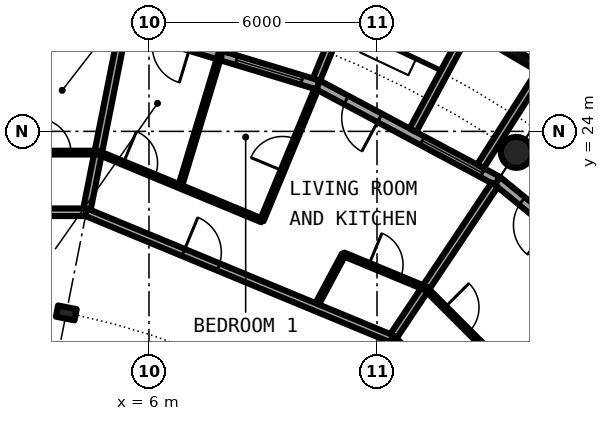
"""IFC4 building model, lengths in metres.
Left out: names, types, materials, properties, quantities, classifications, styles, units other than length and angle.
Written with IfcOpenShell. Run it as: python <this file> out.ifc"""

import sys

from ifc_helpers import new_model, si_unit, direction, frame, frame_2d, origin, origin_2d, place, context, subcontext, project, spatial, rectangle, circle, hollow_circle, i_section, extrude, element, fill, save


model = new_model("IFC4")
c1 = context("Model", 3, precision=1e-05, world=origin(), true_north=direction((0.0, 1.0)))
c2 = subcontext(c1, "Body", "Model", "MODEL_VIEW")
j1 = project(units=[si_unit("LENGTHUNIT", "METRE"), si_unit("PLANEANGLEUNIT", "RADIAN")], contexts=[c1])
p1 = place(None, origin())
s1 = spatial("IfcSite", under=j1, at=p1, CompositionType="ELEMENT")
p2 = place(p1, origin())
s2 = spatial("IfcBuilding", under=s1, at=p2, CompositionType="ELEMENT")
p3 = place(p2, frame((0.0, 0.0, 167.7)))
s3 = spatial("IfcBuildingStorey", under=s2, at=p3, CompositionType="ELEMENT", Elevation=167.7)
p4 = place(p3, frame((15.667, 23.448, 0.0), z_axis=(0.0, 0.0, 1.0), x_axis=(1.0, 0.0, 0.0)))
e1 = element("IfcColumn", 1, at=p4, inside=s3, PredefinedType="COLUMN", context=c2, shape_type="SweptSolid", body=[
    extrude(hollow_circle(Radius=0.406, WallThickness=0.04, at=origin_2d()), origin(), (0.0, 0.0, 1.0), 3.05),
])
p5 = place(p3, frame((3.824, 19.223, 0.0), z_axis=(0.0, 0.0, 1.0), x_axis=(0.195090322016, 0.980785280403, 0.0)))
e2 = element("IfcColumn", 2, at=p5, inside=s3, PredefinedType="COLUMN", context=c2, shape_type="SweptSolid", body=[
    extrude(i_section(OverallWidth=0.3, OverallDepth=0.5, WebThickness=0.014, FlangeThickness=0.028, FilletRadius=0.027, at=origin_2d()), origin(), (0.0, 0.0, 1.0), 3.05),
])
p6 = place(p3, frame((19.304, 19.304, 0.0), z_axis=(0.0, 0.0, 1.0), x_axis=(-0.773019449054, 0.634382322723, 0.0)))
e3 = element("IfcWall", 3, at=p6, inside=s3, PredefinedType="SOLIDWALL", context=c2, shape_type="SweptSolid", body=[
    extrude(rectangle(XDim=5.352, YDim=0.25, at=frame_2d((2.676, 0.0))), origin(), (0.0, 0.0, 1.0), 2.7),
])
p7 = place(p6, frame((0.441, 0.0, 0.3)))
e4 = element("IfcOpeningElement", 4, at=p7, cuts=e3, PredefinedType="OPENING", context=c2, shape_type="SweptSolid", body=[
    extrude(rectangle(XDim=1.8, YDim=2.1, at=frame_2d((0.9, 1.05))), frame((0.0, 0.135, 0.0), z_axis=(0.0, -1.0, 0.0), x_axis=(1.0, 0.0, 0.0)), (0.0, 0.0, 1.0), 0.27),
])
p8 = place(p6, frame((3.51, 0.0, 0.0)))
e5 = element("IfcOpeningElement", 5, at=p8, cuts=e3, PredefinedType="OPENING", context=c2, shape_type="SweptSolid", body=[
    extrude(rectangle(XDim=1.0, YDim=2.2, at=frame_2d((0.5, 1.1))), frame((0.0, 0.135, 0.0), z_axis=(0.0, -1.0, 0.0), x_axis=(1.0, 0.0, 0.0)), (0.0, 0.0, 1.0), 0.27),
])
p9 = place(p3, frame((15.167, 22.699, 0.0), z_axis=(0.0, 0.0, 1.0), x_axis=(-0.881915646801, 0.471407246368, 0.0)))
e6 = element("IfcWall", 6, at=p9, inside=s3, PredefinedType="SOLIDWALL", context=c2, shape_type="SweptSolid", body=[
    extrude(rectangle(XDim=5.352, YDim=0.25, at=frame_2d((2.676, 0.0))), origin(), (0.0, 0.0, 1.0), 2.7),
])
p10 = place(p9, frame((0.441, 0.0, 0.3)))
e7 = element("IfcOpeningElement", 7, at=p10, cuts=e6, PredefinedType="OPENING", context=c2, shape_type="SweptSolid", body=[
    extrude(rectangle(XDim=1.8, YDim=2.1, at=frame_2d((0.9, 1.05))), frame((0.0, 0.135, 0.0), z_axis=(0.0, -1.0, 0.0), x_axis=(1.0, 0.0, 0.0)), (0.0, 0.0, 1.0), 0.27),
])
p11 = place(p9, frame((3.51, 0.0, 0.0)))
e8 = element("IfcOpeningElement", 8, at=p11, cuts=e6, PredefinedType="OPENING", context=c2, shape_type="SweptSolid", body=[
    extrude(rectangle(XDim=1.0, YDim=2.2, at=frame_2d((0.5, 1.1))), frame((0.0, 0.135, 0.0), z_axis=(0.0, -1.0, 0.0), x_axis=(1.0, 0.0, 0.0)), (0.0, 0.0, 1.0), 0.27),
])
p12 = place(p3, frame((16.436, 25.574, -0.03), z_axis=(0.0, 0.0, 1.0), x_axis=(-0.862403467503, 0.506221551535, 0.0)))
e9 = element("IfcWall", 9, at=p12, inside=s3, PredefinedType="SOLIDWALL", context=c2, shape_type="SweptSolid", body=[
    extrude(rectangle(XDim=2.446, YDim=0.2, at=frame_2d((1.223, 0.0))), origin(), (0.0, 0.0, 1.0), 2.73),
])
p13 = place(p12, frame((0.183, 0.0, 0.33)))
e10 = element("IfcOpeningElement", 10, at=p13, cuts=e9, PredefinedType="OPENING", context=c2, shape_type="SweptSolid", body=[
    extrude(circle(Radius=1.04, at=frame_2d((1.04, 1.04))), frame((0.0, 0.11, 0.0), z_axis=(0.0, -1.0, 0.0), x_axis=(1.0, 0.0, 0.0)), (0.0, 0.0, 1.0), 0.22),
])
p14 = place(p3, frame((14.722, 23.079, -0.03), z_axis=(0.0, 0.0, 1.0), x_axis=(0.537572179146, 0.843217737129, 0.0)))
e11 = element("IfcWall", 11, at=p14, inside=s3, PredefinedType="SOLIDWALL", context=c2, shape_type="SweptSolid", body=[
    extrude(rectangle(XDim=2.924, YDim=0.2, at=frame_2d((1.462, 0.0))), origin(), (0.0, 0.0, 1.0), 2.73),
])
p15 = place(p3, frame((12.945, 24.029, -0.03), z_axis=(0.0, 0.0, 1.0), x_axis=(0.474424310775, 0.88029629861, 0.0)))
e12 = element("IfcWall", 12, at=p15, inside=s3, PredefinedType="SOLIDWALL", context=c2, shape_type="SweptSolid", body=[
    extrude(rectangle(XDim=3.006, YDim=0.2, at=frame_2d((1.503, 0.0))), origin(), (0.0, 0.0, 1.0), 2.73),
])
p16 = place(p3, frame((10.447, 25.222, 0.0), z_axis=(0.0, 0.0, 1.0), x_axis=(-0.956965678721, 0.290201119486, 0.0)))
e13 = element("IfcWall", 13, at=p16, inside=s3, PredefinedType="SOLIDWALL", context=c2, shape_type="SweptSolid", body=[
    extrude(rectangle(XDim=5.351, YDim=0.25, at=frame_2d((2.676, 0.0))), origin(), (0.0, 0.0, 1.0), 2.7),
])
p17 = place(p16, frame((0.441, 0.0, 0.3)))
e14 = element("IfcOpeningElement", 14, at=p17, cuts=e13, PredefinedType="OPENING", context=c2, shape_type="SweptSolid", body=[
    extrude(rectangle(XDim=1.8, YDim=2.1, at=frame_2d((0.9, 1.05))), frame((0.0, 0.135, 0.0), z_axis=(0.0, -1.0, 0.0), x_axis=(1.0, 0.0, 0.0)), (0.0, 0.0, 1.0), 0.27),
])
p18 = place(p16, frame((3.51, 0.0, 0.0)))
e15 = element("IfcOpeningElement", 15, at=p18, cuts=e13, PredefinedType="OPENING", context=c2, shape_type="SweptSolid", body=[
    extrude(rectangle(XDim=1.0, YDim=2.2, at=frame_2d((0.5, 1.1))), frame((0.0, 0.135, 0.0), z_axis=(0.0, -1.0, 0.0), x_axis=(1.0, 0.0, 0.0)), (0.0, 0.0, 1.0), 0.27),
])
p19 = place(p3, frame((10.409, 25.364, -0.03), z_axis=(0.0, 0.0, 1.0), x_axis=(0.379509886562, 0.925187681501, 0.0)))
e16 = element("IfcWall", 16, at=p19, inside=s3, PredefinedType="SOLIDWALL", context=c2, shape_type="SweptSolid", body=[
    extrude(rectangle(XDim=2.883, YDim=0.2, at=frame_2d((1.441, 0.0))), origin(), (0.0, 0.0, 1.0), 2.73),
])
p20 = place(p3, frame((8.009, 26.092, -0.03), z_axis=(0.0, 0.0, 1.0), x_axis=(0.293406695073, 0.955987715029, 0.0)))
e17 = element("IfcWall", 17, at=p20, inside=s3, PredefinedType="SOLIDWALL", context=c2, shape_type="SweptSolid", body=[
    extrude(rectangle(XDim=3.006, YDim=0.2, at=frame_2d((1.503, 0.0))), origin(), (0.0, 0.0, 1.0), 2.73),
])
p21 = place(p3, frame((10.38, 19.374, 0.0), z_axis=(0.0, 0.0, 1.0), x_axis=(0.472002235476, 0.881597351236, 0.0)))
e18 = element("IfcWall", 18, at=p21, inside=s3, PredefinedType="PARTITIONING", context=c2, shape_type="SweptSolid", body=[
    extrude(rectangle(XDim=1.577, YDim=0.1, at=frame_2d((0.788, 0.0))), origin(), (0.0, 0.0, 1.0), 2.7),
])
p22 = place(p3, frame((4.351, 21.872, 0.0), z_axis=(0.0, 0.0, 1.0), x_axis=(0.195075825861, 0.980788163756, 0.0)))
e19 = element("IfcWall", 19, at=p22, inside=s3, PredefinedType="PARTITIONING", context=c2, shape_type="SweptSolid", body=[
    extrude(rectangle(XDim=4.875, YDim=0.2, at=frame_2d((2.438, 0.0))), origin(), (0.0, 0.0, 1.0), 2.7),
])
p23 = place(p3, frame((6.817, 22.549, 0.0), z_axis=(0.0, 0.0, 1.0), x_axis=(0.289439829793, 0.957196210256, 0.0)))
e20 = element("IfcWall", 20, at=p23, inside=s3, PredefinedType="PARTITIONING", context=c2, shape_type="SweptSolid", body=[
    extrude(rectangle(XDim=3.618, YDim=0.1, at=frame_2d((1.809, 0.0))), origin(), (0.0, 0.0, 1.0), 2.7),
])
p24 = place(p3, frame((8.97, 21.657, 0.0), z_axis=(0.0, 0.0, 1.0), x_axis=(0.382761856702, 0.923847044188, 0.0)))
e21 = element("IfcWall", 21, at=p24, inside=s3, PredefinedType="PARTITIONING", context=c2, shape_type="SweptSolid", body=[
    extrude(rectangle(XDim=3.733, YDim=0.1, at=frame_2d((1.867, 0.0))), origin(), (0.0, 0.0, 1.0), 2.7),
])
p25 = place(p24, frame((1.417, 0.0, 0.0)))
e22 = element("IfcOpeningElement", 22, at=p25, cuts=e21, PredefinedType="OPENING", context=c2, shape_type="SweptSolid", body=[
    extrude(rectangle(XDim=0.9, YDim=2.3, at=frame_2d((0.45, 1.15))), frame((0.0, 0.06, 0.0), z_axis=(0.0, -1.0, 0.0), x_axis=(1.0, 0.0, 0.0)), (0.0, 0.0, 1.0), 0.12),
])
p26 = place(p3, frame((12.388, 18.543, 0.0), z_axis=(0.0, 0.0, 1.0), x_axis=(0.55555521993, 0.831479643532, 0.0)))
e23 = element("IfcWall", 23, at=p26, inside=s3, PredefinedType="PARTITIONING", context=c2, shape_type="SweptSolid", body=[
    extrude(rectangle(XDim=4.875, YDim=0.2, at=frame_2d((2.437, 0.0))), origin(), (0.0, 0.0, 1.0), 2.7),
])
p27 = place(p3, frame((-4.351, 21.872, 0.0), z_axis=(0.0, 0.0, 1.0), x_axis=(1.0, 0.0, 0.0)))
e24 = element("IfcWall", 24, at=p27, inside=s3, PredefinedType="PARTITIONING", context=c2, shape_type="SweptSolid", body=[
    extrude(rectangle(XDim=8.702, YDim=0.2, at=frame_2d((4.351, 0.0))), origin(), (0.0, 0.0, 1.0), 2.7),
])
p28 = place(p27, frame((4.939, 0.0, 0.0)))
e25 = element("IfcOpeningElement", 25, at=p28, cuts=e24, PredefinedType="OPENING", context=c2, shape_type="SweptSolid", body=[
    extrude(rectangle(XDim=1.0, YDim=2.3, at=frame_2d((0.5, 1.15))), frame((0.0, 0.11, 0.0), z_axis=(0.0, -1.0, 0.0), x_axis=(1.0, 0.0, 0.0)), (0.0, 0.0, 1.0), 0.22),
])
p29 = place(p3, frame((4.347, 21.872, 0.0), z_axis=(0.0, 0.0, 1.0), x_axis=(0.923921124994, -0.382583003792, 0.0)))
e26 = element("IfcWall", 26, at=p29, inside=s3, PredefinedType="PARTITIONING", context=c2, shape_type="SweptSolid", body=[
    extrude(rectangle(XDim=8.704, YDim=0.2, at=frame_2d((4.352, 0.0))), origin(), (0.0, 0.0, 1.0), 2.7),
])
p30 = place(p29, frame((2.767, 0.0, 0.0)))
e27 = element("IfcOpeningElement", 27, at=p30, cuts=e26, PredefinedType="OPENING", context=c2, shape_type="SweptSolid", body=[
    extrude(rectangle(XDim=1.0, YDim=2.3, at=frame_2d((0.5, 1.15))), frame((0.0, 0.11, 0.0), z_axis=(0.0, -1.0, 0.0), x_axis=(1.0, 0.0, 0.0)), (0.0, 0.0, 1.0), 0.22),
])
p31 = place(p3, frame((12.389, 18.542, 0.0), z_axis=(0.0, 0.0, 1.0), x_axis=(0.707106781187, -0.707106781187, 0.0)))
e28 = element("IfcWall", 28, at=p31, inside=s3, PredefinedType="PARTITIONING", context=c2, shape_type="SweptSolid", body=[
    extrude(rectangle(XDim=8.702, YDim=0.2, at=frame_2d((4.351, 0.0))), origin(), (0.0, 0.0, 1.0), 2.7),
])
p32 = place(p31, frame((4.938, 0.0, 0.0)))
e29 = element("IfcOpeningElement", 29, at=p32, cuts=e28, PredefinedType="OPENING", context=c2, shape_type="SweptSolid", body=[
    extrude(rectangle(XDim=1.0, YDim=2.3, at=frame_2d((0.5, 1.15))), frame((0.0, 0.11, 0.0), z_axis=(0.0, -1.0, 0.0), x_axis=(1.0, 0.0, 0.0)), (0.0, 0.0, 1.0), 0.22),
])
p33 = place(p3, frame((0.0, 23.441, 0.0), z_axis=(0.0, 0.0, 1.0), x_axis=(1.0, 0.0, 0.0)))
e30 = element("IfcWall", 30, at=p33, inside=s3, PredefinedType="PARTITIONING", context=c2, shape_type="SweptSolid", body=[
    extrude(rectangle(XDim=4.663, YDim=0.1, at=frame_2d((2.332, 0.0))), origin(), (0.0, 0.0, 1.0), 2.7),
])
p34 = place(p33, frame((3.047, 0.0, 0.0)))
e31 = element("IfcOpeningElement", 31, at=p34, cuts=e30, PredefinedType="OPENING", context=c2, shape_type="SweptSolid", body=[
    extrude(rectangle(XDim=0.9, YDim=2.3, at=frame_2d((0.45, 1.15))), frame((0.0, 0.06, 0.0), z_axis=(0.0, -1.0, 0.0), x_axis=(1.0, 0.0, 0.0)), (0.0, 0.0, 1.0), 0.12),
])
p35 = place(p3, frame((4.66, 23.441, 0.0), z_axis=(0.0, 0.0, 1.0), x_axis=(0.923920484476, -0.38258455061, 0.0)))
e32 = element("IfcWall", 32, at=p35, inside=s3, PredefinedType="PARTITIONING", context=c2, shape_type="SweptSolid", body=[
    extrude(rectangle(XDim=4.663, YDim=0.1, at=frame_2d((2.332, 0.0))), origin(), (0.0, 0.0, 1.0), 2.7),
])
p36 = place(p35, frame((0.72, 0.0, 0.0)))
e33 = element("IfcOpeningElement", 33, at=p36, cuts=e32, PredefinedType="OPENING", context=c2, shape_type="SweptSolid", body=[
    extrude(rectangle(XDim=0.9, YDim=2.3, at=frame_2d((0.45, 1.15))), frame((0.0, 0.06, 0.0), z_axis=(0.0, -1.0, 0.0), x_axis=(1.0, 0.0, 0.0)), (0.0, 0.0, 1.0), 0.12),
])
p37 = place(p3, frame((11.124, 20.764, 0.0), z_axis=(0.0, 0.0, 1.0), x_axis=(0.923938991376, -0.382539854414, 0.0)))
e34 = element("IfcWall", 34, at=p37, inside=s3, PredefinedType="PARTITIONING", context=c2, shape_type="SweptSolid", body=[
    extrude(rectangle(XDim=2.331, YDim=0.1, at=frame_2d((1.166, 0.0))), origin(), (0.0, 0.0, 1.0), 2.7),
])
p38 = place(p37, frame((0.716, 0.0, 0.0)))
e35 = element("IfcOpeningElement", 35, at=p38, cuts=e34, PredefinedType="OPENING", context=c2, shape_type="SweptSolid", body=[
    extrude(rectangle(XDim=0.9, YDim=2.3, at=frame_2d((0.45, 1.15))), frame((0.0, 0.06, 0.0), z_axis=(0.0, -1.0, 0.0), x_axis=(1.0, 0.0, 0.0)), (0.0, 0.0, 1.0), 0.12),
])
p39 = place(p3, frame((13.283, 19.867, 0.0), z_axis=(0.0, 0.0, 1.0), x_axis=(0.707106781187, -0.707106781187, 0.0)))
e36 = element("IfcWall", 36, at=p39, inside=s3, PredefinedType="PARTITIONING", context=c2, shape_type="SweptSolid", body=[
    extrude(rectangle(XDim=2.332, YDim=0.1, at=frame_2d((1.166, 0.0))), origin(), (0.0, 0.0, 1.0), 2.7),
])
p40 = place(p39, frame((0.709, 0.0, 0.0)))
e37 = element("IfcOpeningElement", 37, at=p40, cuts=e36, PredefinedType="OPENING", context=c2, shape_type="SweptSolid", body=[
    extrude(rectangle(XDim=0.9, YDim=2.3, at=frame_2d((0.45, 1.15))), frame((0.0, 0.06, 0.0), z_axis=(0.0, -1.0, 0.0), x_axis=(1.0, 0.0, 0.0)), (0.0, 0.0, 1.0), 0.12),
])
p41 = place(p8, origin())
e38 = element("IfcDoor", 38, at=p41, inside=s3, OperationType="SINGLE_SWING_LEFT", PredefinedType="DOOR", context=c2, shape_type="SweptSolid", body=[
    extrude(rectangle(XDim=1.0, YDim=2.2, at=frame_2d((0.5, 1.1))), frame((0.0, 0.025, 0.0), z_axis=(0.0, -1.0, 0.0), x_axis=(1.0, 0.0, 0.0)), (0.0, 0.0, 1.0), 0.05),
])
fill(e5, e38)
p42 = place(p10, origin())
e39 = element("IfcWindow", 39, at=p42, inside=s3, PartitioningType="SINGLE_PANEL", PredefinedType="WINDOW", context=c2, shape_type="SweptSolid", body=[
    extrude(rectangle(XDim=1.8, YDim=2.1, at=frame_2d((0.9, 1.05))), frame((0.0, 0.03, 0.0), z_axis=(0.0, -1.0, 0.0), x_axis=(1.0, 0.0, 0.0)), (0.0, 0.0, 1.0), 0.06),
])
fill(e7, e39)
p43 = place(p13, origin())
e40 = element("IfcWindow", 40, at=p43, inside=s3, PartitioningType="SINGLE_PANEL", PredefinedType="WINDOW", context=c2, shape_type="SweptSolid", body=[
    extrude(circle(Radius=1.04, at=frame_2d((1.04, 1.04))), frame((0.0, 0.03, 0.0), z_axis=(0.0, -1.0, 0.0), x_axis=(1.0, 0.0, 0.0)), (0.0, 0.0, 1.0), 0.06),
])
fill(e10, e40)
p44 = place(p11, origin())
e41 = element("IfcDoor", 41, at=p44, inside=s3, OperationType="SINGLE_SWING_LEFT", PredefinedType="DOOR", context=c2, shape_type="SweptSolid", body=[
    extrude(rectangle(XDim=1.0, YDim=2.2, at=frame_2d((0.5, 1.1))), frame((0.0, 0.025, 0.0), z_axis=(0.0, -1.0, 0.0), x_axis=(1.0, 0.0, 0.0)), (0.0, 0.0, 1.0), 0.05),
])
fill(e8, e41)
p45 = place(p17, origin())
e42 = element("IfcWindow", 42, at=p45, inside=s3, PartitioningType="SINGLE_PANEL", PredefinedType="WINDOW", context=c2, shape_type="SweptSolid", body=[
    extrude(rectangle(XDim=1.8, YDim=2.1, at=frame_2d((0.9, 1.05))), frame((0.0, 0.03, 0.0), z_axis=(0.0, -1.0, 0.0), x_axis=(1.0, 0.0, 0.0)), (0.0, 0.0, 1.0), 0.06),
])
fill(e14, e42)
p46 = place(p40, origin())
e43 = element("IfcDoor", 43, at=p46, inside=s3, OperationType="SINGLE_SWING_LEFT", PredefinedType="DOOR", context=c2, shape_type="SweptSolid", body=[
    extrude(rectangle(XDim=0.9, YDim=2.3, at=frame_2d((0.45, 1.15))), frame((0.0, 0.025, 0.0), z_axis=(0.0, -1.0, 0.0), x_axis=(1.0, 0.0, 0.0)), (0.0, 0.0, 1.0), 0.05),
])
fill(e37, e43)
p47 = place(p30, origin())
e44 = element("IfcDoor", 44, at=p47, inside=s3, OperationType="SINGLE_SWING_LEFT", PredefinedType="DOOR", context=c2, shape_type="SweptSolid", body=[
    extrude(rectangle(XDim=1.0, YDim=2.3, at=frame_2d((0.5, 1.15))), frame((0.0, 0.025, 0.0), z_axis=(0.0, -1.0, 0.0), x_axis=(1.0, 0.0, 0.0)), (0.0, 0.0, 1.0), 0.05),
])
fill(e27, e44)
p48 = place(p38, origin())
e45 = element("IfcDoor", 45, at=p48, inside=s3, OperationType="SINGLE_SWING_LEFT", PredefinedType="DOOR", context=c2, shape_type="SweptSolid", body=[
    extrude(rectangle(XDim=0.9, YDim=2.3, at=frame_2d((0.45, 1.15))), frame((0.0, 0.025, 0.0), z_axis=(0.0, -1.0, 0.0), x_axis=(1.0, 0.0, 0.0)), (0.0, 0.0, 1.0), 0.05),
])
fill(e35, e45)
p49 = place(p25, origin())
e46 = element("IfcDoor", 46, at=p49, inside=s3, OperationType="SINGLE_SWING_LEFT", PredefinedType="DOOR", context=c2, shape_type="SweptSolid", body=[
    extrude(rectangle(XDim=0.9, YDim=2.3, at=frame_2d((0.45, 1.15))), frame((0.0, 0.025, 0.0), z_axis=(0.0, -1.0, 0.0), x_axis=(1.0, 0.0, 0.0)), (0.0, 0.0, 1.0), 0.05),
])
fill(e22, e46)
p50 = place(p36, origin())
e47 = element("IfcDoor", 47, at=p50, inside=s3, OperationType="SINGLE_SWING_LEFT", PredefinedType="DOOR", context=c2, shape_type="SweptSolid", body=[
    extrude(rectangle(XDim=0.9, YDim=2.3, at=frame_2d((0.45, 1.15))), frame((0.0, 0.025, 0.0), z_axis=(0.0, -1.0, 0.0), x_axis=(1.0, 0.0, 0.0)), (0.0, 0.0, 1.0), 0.05),
])
fill(e33, e47)
p51 = place(p34, origin())
e48 = element("IfcDoor", 48, at=p51, inside=s3, OperationType="SINGLE_SWING_RIGHT", PredefinedType="DOOR", context=c2, shape_type="SweptSolid", body=[
    extrude(rectangle(XDim=0.9, YDim=2.3, at=frame_2d((0.45, 1.15))), frame((0.0, 0.025, 0.0), z_axis=(0.0, -1.0, 0.0), x_axis=(1.0, 0.0, 0.0)), (0.0, 0.0, 1.0), 0.05),
])
fill(e31, e48)
save(model, sys.argv[1])
